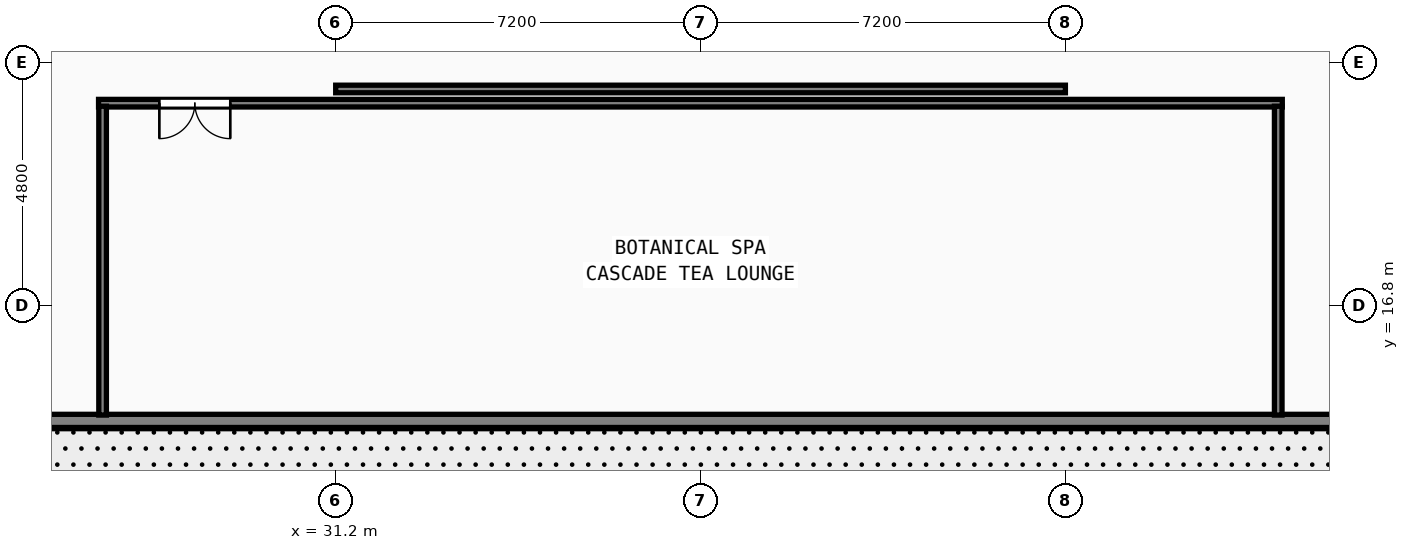
"""IFC4 building model, lengths in metres.
Left out: names, types, materials, properties, quantities, classifications, styles, units other than length and angle.
Written with IfcOpenShell. Run it as: python <this file> out.ifc"""

import sys

from ifc_helpers import new_model, si_unit, direction, frame, frame_2d, origin, origin_2d, place, context, subcontext, project, spatial, rectangle, hollow_rectangle, extrude, element, fill, save


model = new_model("IFC4")
c1 = context("Model", 3, precision=1e-05, world=origin(), true_north=direction((0.0, 1.0)))
c2 = subcontext(c1, "Body", "Model", "MODEL_VIEW")
j1 = project(units=[si_unit("LENGTHUNIT", "METRE"), si_unit("PLANEANGLEUNIT", "RADIAN")], contexts=[c1])
p1 = place(None, origin())
s1 = spatial("IfcSite", under=j1, at=p1, CompositionType="ELEMENT")
p2 = place(p1, origin())
s2 = spatial("IfcBuilding", under=s1, at=p2, CompositionType="ELEMENT")
p3 = place(p2, frame((0.0, 0.0, 19.8)))
s3 = spatial("IfcBuildingStorey", under=s2, at=p3, CompositionType="ELEMENT", Elevation=19.8)
for number, where, z_axis, x_axis in (
    (1, (31.2, 21.6, 0.0), (0.0, 0.0, 1.0), (1.0, 0.0, 0.0)),
    (2, (45.6, 21.6, 0.0), (0.0, 0.0, 1.0), (1.0, 0.0, 0.0)),
):
    element("IfcColumn", number, at=place(p3, frame(where, z_axis=z_axis, x_axis=x_axis)), inside=s3, PredefinedType="COLUMN", context=c2, shape_type="SweptSolid", body=[
        extrude(hollow_rectangle(XDim=1.3, YDim=1.3, WallThickness=0.048, at=origin_2d()), origin(), (0.0, 0.0, 1.0), 4.2),
    ])
p4 = place(p3, frame((7.199, 14.53, 0.0), z_axis=(0.0, 0.0, 1.0), x_axis=(1.0, 0.0, 0.0)))
e3 = element("IfcWall", 3, at=p4, inside=s3, PredefinedType="SOLIDWALL", context=c2, shape_type="SweptSolid", body=[
    extrude(rectangle(XDim=62.403, YDim=0.26, at=frame_2d((31.201, 0.0))), origin(), (0.0, 0.0, 1.0), 4.0),
])
p5 = place(p4, frame((62.182, 0.0, 0.0), z_axis=(0.0, 0.0, 1.0), x_axis=(-1.0, 0.0, 0.0)))
e4 = element("IfcOpeningElement", 4, at=p5, cuts=e3, PredefinedType="OPENING", context=c2, shape_type="SweptSolid", body=[
    extrude(rectangle(XDim=1.5, YDim=2.2, at=frame_2d((0.75, 1.1))), frame((0.0, 0.14, 0.0), z_axis=(0.0, -1.0, 0.0), x_axis=(1.0, 0.0, 0.0)), (0.0, 0.0, 1.0), 0.28),
])
p6 = place(p3, frame((31.2, 21.08, 0.0), z_axis=(0.0, 0.0, 1.0), x_axis=(1.0, 0.0, 0.0)))
e5 = element("IfcWall", 5, at=p6, inside=s3, PredefinedType="PARTITIONING", context=c2, shape_type="SweptSolid", body=[
    extrude(rectangle(XDim=14.4, YDim=0.15, at=frame_2d((7.2, 0.0))), origin(), (0.0, 0.0, 1.0), 4.0),
])
p7 = place(p3, frame((26.52, 20.8, 0.0), z_axis=(0.0, 0.0, 1.0), x_axis=(1.0, 0.0, 0.0)))
e6 = element("IfcWall", 6, at=p7, inside=s3, PredefinedType="PARTITIONING", context=c2, shape_type="SweptSolid", body=[
    extrude(rectangle(XDim=23.36, YDim=0.15, at=frame_2d((11.68, 0.0))), origin(), (0.0, 0.0, 1.0), 4.0),
])
p8 = place(p7, frame((2.6, 0.0, 0.0), z_axis=(0.0, 0.0, 1.0), x_axis=(-1.0, 0.0, 0.0)))
e7 = element("IfcOpeningElement", 7, at=p8, cuts=e6, PredefinedType="OPENING", context=c2, shape_type="SweptSolid", body=[
    extrude(rectangle(XDim=1.4, YDim=2.18, at=frame_2d((0.7, 1.09))), frame((0.0, 0.085, 0.0), z_axis=(0.0, -1.0, 0.0), x_axis=(1.0, 0.0, 0.0)), (0.0, 0.0, 1.0), 0.17),
])
for number, where, z_axis, x_axis in (
    (8, (26.6, 14.645, 0.0), (0.0, 0.0, 1.0), (0.0, 1.0, 0.0)),
    (9, (49.8, 14.645, 0.0), (0.0, 0.0, 1.0), (0.0, 1.0, 0.0)),
):
    element("IfcWall", number, at=place(p3, frame(where, z_axis=z_axis, x_axis=x_axis)), inside=s3, PredefinedType="PARTITIONING", context=c2, shape_type="SweptSolid", body=[
        extrude(rectangle(XDim=6.095, YDim=0.15, at=frame_2d((3.047, 0.0))), origin(), (0.0, 0.0, 1.0), 4.0),
    ])
p9 = place(p8, origin())
e10 = element("IfcDoor", 10, at=p9, inside=s3, OperationType="DOUBLE_DOOR_SINGLE_SWING", PredefinedType="DOOR", context=c2, shape_type="SweptSolid", body=[
    extrude(rectangle(XDim=1.4, YDim=2.18, at=frame_2d((0.7, 1.09))), frame((0.0, 0.025, 0.0), z_axis=(0.0, -1.0, 0.0), x_axis=(1.0, 0.0, 0.0)), (0.0, 0.0, 1.0), 0.05),
])
fill(e7, e10)
save(model, sys.argv[1])
